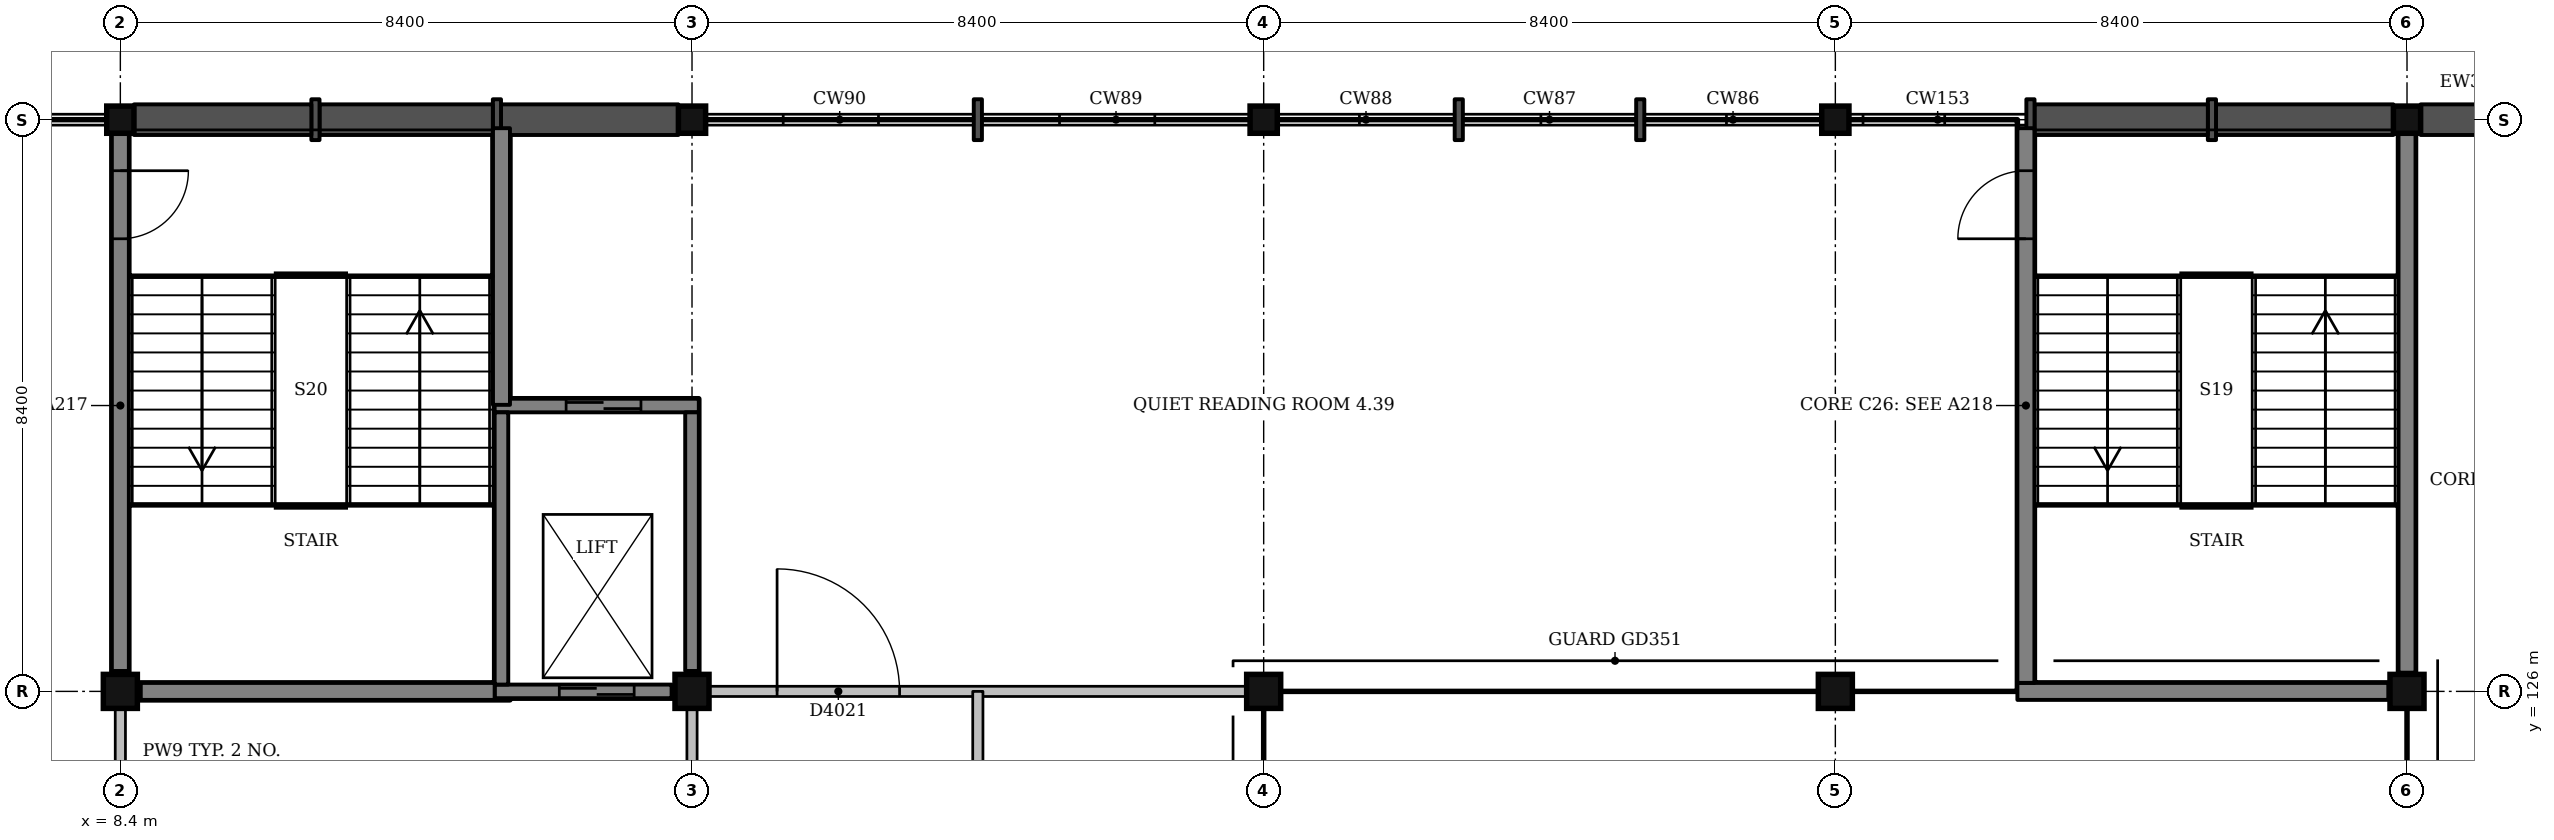
"""IFC4 building model, lengths in metres.
Left out: names, types, materials, properties, quantities, classifications, styles, units other than length and angle.
Written with IfcOpenShell. Run it as: python <this file> out.ifc"""

import sys

from ifc_helpers import new_model, si_unit, direction, frame, frame_2d, origin, origin_2d, place, context, subcontext, project, spatial, rectangle, extrude, element, fill, save


model = new_model("IFC4")
c1 = context("Model", 3, precision=1e-05, world=origin(), true_north=direction((0.0, 1.0)))
c2 = subcontext(c1, "Body", "Model", "MODEL_VIEW")
j1 = project(units=[si_unit("LENGTHUNIT", "METRE"), si_unit("PLANEANGLEUNIT", "RADIAN")], contexts=[c1])
p1 = place(None, origin())
s1 = spatial("IfcSite", under=j1, at=p1, CompositionType="ELEMENT")
p2 = place(p1, origin())
s2 = spatial("IfcBuilding", under=s1, at=p2, CompositionType="ELEMENT")
p3 = place(p2, frame((0.0, 0.0, 18.0)))
s3 = spatial("IfcBuildingStorey", under=s2, at=p3, CompositionType="ELEMENT", Elevation=18.0)
p4 = place(p3, frame((8.4, 126.0, 0.0), z_axis=(0.0, 0.0, 1.0), x_axis=(1.0, 0.0, 0.0)))
e1 = element("IfcColumn", 1, at=p4, inside=s3, PredefinedType="COLUMN", context=c2, shape_type="SweptSolid", body=[
    extrude(rectangle(XDim=0.5, YDim=0.5, at=origin_2d()), origin(), (0.0, 0.0, 1.0), 4.5),
])
p5 = place(p3, frame((8.4, 134.4, 0.0), z_axis=(0.0, 0.0, 1.0), x_axis=(1.0, 0.0, 0.0)))
e2 = element("IfcColumn", 2, at=p5, inside=s3, PredefinedType="COLUMN", context=c2, shape_type="SweptSolid", body=[
    extrude(rectangle(XDim=0.4, YDim=0.4, at=origin_2d()), origin(), (0.0, 0.0, 1.0), 4.5),
])
p6 = place(p3, frame((16.8, 126.0, 0.0), z_axis=(0.0, 0.0, 1.0), x_axis=(1.0, 0.0, 0.0)))
e3 = element("IfcColumn", 3, at=p6, inside=s3, PredefinedType="COLUMN", context=c2, shape_type="SweptSolid", body=[
    extrude(rectangle(XDim=0.5, YDim=0.5, at=origin_2d()), origin(), (0.0, 0.0, 1.0), 4.5),
])
p7 = place(p3, frame((16.8, 134.4, 0.0), z_axis=(0.0, 0.0, 1.0), x_axis=(1.0, 0.0, 0.0)))
e4 = element("IfcColumn", 4, at=p7, inside=s3, PredefinedType="COLUMN", context=c2, shape_type="SweptSolid", body=[
    extrude(rectangle(XDim=0.4, YDim=0.4, at=origin_2d()), origin(), (0.0, 0.0, 1.0), 4.5),
])
p8 = place(p3, frame((25.2, 126.0, 0.0), z_axis=(0.0, 0.0, 1.0), x_axis=(1.0, 0.0, 0.0)))
e5 = element("IfcColumn", 5, at=p8, inside=s3, PredefinedType="COLUMN", context=c2, shape_type="SweptSolid", body=[
    extrude(rectangle(XDim=0.5, YDim=0.5, at=origin_2d()), origin(), (0.0, 0.0, 1.0), 4.5),
])
p9 = place(p3, frame((25.2, 134.4, 0.0), z_axis=(0.0, 0.0, 1.0), x_axis=(1.0, 0.0, 0.0)))
e6 = element("IfcColumn", 6, at=p9, inside=s3, PredefinedType="COLUMN", context=c2, shape_type="SweptSolid", body=[
    extrude(rectangle(XDim=0.4, YDim=0.4, at=origin_2d()), origin(), (0.0, 0.0, 1.0), 4.5),
])
p10 = place(p3, frame((33.6, 126.0, 0.0), z_axis=(0.0, 0.0, 1.0), x_axis=(1.0, 0.0, 0.0)))
e7 = element("IfcColumn", 7, at=p10, inside=s3, PredefinedType="COLUMN", context=c2, shape_type="SweptSolid", body=[
    extrude(rectangle(XDim=0.5, YDim=0.5, at=origin_2d()), origin(), (0.0, 0.0, 1.0), 4.5),
])
p11 = place(p3, frame((33.6, 134.4, 0.0), z_axis=(0.0, 0.0, 1.0), x_axis=(1.0, 0.0, 0.0)))
e8 = element("IfcColumn", 8, at=p11, inside=s3, PredefinedType="COLUMN", context=c2, shape_type="SweptSolid", body=[
    extrude(rectangle(XDim=0.4, YDim=0.4, at=origin_2d()), origin(), (0.0, 0.0, 1.0), 4.5),
])
p12 = place(p3, frame((42.0, 126.0, 0.0), z_axis=(0.0, 0.0, 1.0), x_axis=(1.0, 0.0, 0.0)))
e9 = element("IfcColumn", 9, at=p12, inside=s3, PredefinedType="COLUMN", context=c2, shape_type="SweptSolid", body=[
    extrude(rectangle(XDim=0.5, YDim=0.5, at=origin_2d()), origin(), (0.0, 0.0, 1.0), 4.5),
])
p13 = place(p3, frame((42.0, 134.4, 0.0), z_axis=(0.0, 0.0, 1.0), x_axis=(1.0, 0.0, 0.0)))
e10 = element("IfcColumn", 10, at=p13, inside=s3, PredefinedType="COLUMN", context=c2, shape_type="SweptSolid", body=[
    extrude(rectangle(XDim=0.4, YDim=0.4, at=origin_2d()), origin(), (0.0, 0.0, 1.0), 4.5),
])
p14 = place(p3, frame((13.9, 126.0, 0.0), z_axis=(0.0, 0.0, 1.0), x_axis=(1.0, 0.0, 0.0)))
e11 = element("IfcWall", 11, at=p14, inside=s3, PredefinedType="SHEAR", context=c2, shape_type="SweptSolid", body=[
    extrude(rectangle(XDim=2.6, YDim=0.2, at=frame_2d((1.3, 0.0))), origin(), (0.0, 0.0, 1.0), 4.5),
])
p15 = place(p14, frame((0.95, 0.0, 0.0)))
e12 = element("IfcOpeningElement", 12, at=p15, cuts=e11, PredefinedType="OPENING", context=c2, shape_type="SweptSolid", body=[
    extrude(rectangle(XDim=1.1, YDim=2.1, at=frame_2d((0.55, 1.05))), frame((0.0, 0.11, 0.0), z_axis=(0.0, -1.0, 0.0), x_axis=(1.0, 0.0, 0.0)), (0.0, 0.0, 1.0), 0.22),
])
p16 = place(p3, frame((13.9, 130.2, 0.0), z_axis=(0.0, 0.0, 1.0), x_axis=(1.0, 0.0, 0.0)))
e13 = element("IfcWall", 13, at=p16, inside=s3, PredefinedType="SHEAR", context=c2, shape_type="SweptSolid", body=[
    extrude(rectangle(XDim=3.0, YDim=0.2, at=frame_2d((1.5, 0.0))), origin(), (0.0, 0.0, 1.0), 4.5),
])
p17 = place(p16, frame((1.05, 0.0, 0.0)))
e14 = element("IfcOpeningElement", 14, at=p17, cuts=e13, PredefinedType="OPENING", context=c2, shape_type="SweptSolid", body=[
    extrude(rectangle(XDim=1.1, YDim=2.1, at=frame_2d((0.55, 1.05))), frame((0.0, 0.11, 0.0), z_axis=(0.0, -1.0, 0.0), x_axis=(1.0, 0.0, 0.0)), (0.0, 0.0, 1.0), 0.22),
])
p18 = place(p3, frame((14.0, 126.1, 0.0), z_axis=(0.0, 0.0, 1.0), x_axis=(0.0, 1.0, 0.0)))
e15 = element("IfcWall", 15, at=p18, inside=s3, PredefinedType="SHEAR", context=c2, shape_type="SweptSolid", body=[
    extrude(rectangle(XDim=4.0, YDim=0.2, at=frame_2d((2.0, 0.0))), origin(), (0.0, 0.0, 1.0), 4.5),
])
p19 = place(p3, frame((16.8, 126.3, 0.0), z_axis=(0.0, 0.0, 1.0), x_axis=(0.0, 1.0, 0.0)))
e16 = element("IfcWall", 16, at=p19, inside=s3, PredefinedType="SHEAR", context=c2, shape_type="SweptSolid", body=[
    extrude(rectangle(XDim=3.8, YDim=0.2, at=frame_2d((1.9, 0.0))), origin(), (0.0, 0.0, 1.0), 4.5),
])
p20 = place(p3, frame((36.275, 126.0, 0.0), z_axis=(0.0, 0.0, 1.0), x_axis=(1.0, 0.0, 0.0)))
e17 = element("IfcWall", 17, at=p20, inside=s3, PredefinedType="SHEAR", context=c2, shape_type="SweptSolid", body=[
    extrude(rectangle(XDim=5.45, YDim=0.25, at=frame_2d((2.725, 0.0))), origin(), (0.0, 0.0, 1.0), 4.5),
])
p21 = place(p3, frame((36.4, 126.125, 0.0), z_axis=(0.0, 0.0, 1.0), x_axis=(0.0, 1.0, 0.0)))
e18 = element("IfcWall", 18, at=p21, inside=s3, PredefinedType="SHEAR", context=c2, shape_type="SweptSolid", body=[
    extrude(rectangle(XDim=8.15, YDim=0.25, at=frame_2d((4.075, 0.0))), origin(), (0.0, 0.0, 1.0), 4.5),
])
p22 = place(p21, frame((6.525, 0.0, 0.0)))
e19 = element("IfcOpeningElement", 19, at=p22, cuts=e18, PredefinedType="OPENING", context=c2, shape_type="SweptSolid", body=[
    extrude(rectangle(XDim=1.0, YDim=2.1, at=frame_2d((0.5, 1.05))), frame((0.0, 0.135, 0.0), z_axis=(0.0, -1.0, 0.0), x_axis=(1.0, 0.0, 0.0)), (0.0, 0.0, 1.0), 0.27),
])
p23 = place(p3, frame((42.0, 126.275, 0.0), z_axis=(0.0, 0.0, 1.0), x_axis=(0.0, 1.0, 0.0)))
e20 = element("IfcWall", 20, at=p23, inside=s3, PredefinedType="SHEAR", context=c2, shape_type="SweptSolid", body=[
    extrude(rectangle(XDim=7.925, YDim=0.25, at=frame_2d((3.962, 0.0))), origin(), (0.0, 0.0, 1.0), 4.5),
])
p24 = place(p3, frame((8.7, 126.0, 0.0), z_axis=(0.0, 0.0, 1.0), x_axis=(1.0, 0.0, 0.0)))
e21 = element("IfcWall", 21, at=p24, inside=s3, PredefinedType="SHEAR", context=c2, shape_type="SweptSolid", body=[
    extrude(rectangle(XDim=5.2, YDim=0.25, at=frame_2d((2.6, 0.0))), origin(), (0.0, 0.0, 1.0), 4.5),
])
p25 = place(p3, frame((8.4, 126.3, 0.0), z_axis=(0.0, 0.0, 1.0), x_axis=(0.0, 1.0, 0.0)))
e22 = element("IfcWall", 22, at=p25, inside=s3, PredefinedType="SHEAR", context=c2, shape_type="SweptSolid", body=[
    extrude(rectangle(XDim=7.9, YDim=0.25, at=frame_2d((3.95, 0.0))), origin(), (0.0, 0.0, 1.0), 4.5),
])
p26 = place(p25, frame((6.35, 0.0, 0.0)))
e23 = element("IfcOpeningElement", 23, at=p26, cuts=e22, PredefinedType="OPENING", context=c2, shape_type="SweptSolid", body=[
    extrude(rectangle(XDim=1.0, YDim=2.1, at=frame_2d((0.5, 1.05))), frame((0.0, 0.135, 0.0), z_axis=(0.0, -1.0, 0.0), x_axis=(1.0, 0.0, 0.0)), (0.0, 0.0, 1.0), 0.27),
])
p27 = place(p3, frame((14.0, 130.21, 0.0), z_axis=(0.0, 0.0, 1.0), x_axis=(0.0, 1.0, 0.0)))
e24 = element("IfcWall", 24, at=p27, inside=s3, PredefinedType="SHEAR", context=c2, shape_type="SweptSolid", body=[
    extrude(rectangle(XDim=4.065, YDim=0.25, at=frame_2d((2.032, 0.0))), origin(), (0.0, 0.0, 1.0), 4.5),
])
for number, where, z_axis, x_axis in (
    (25, (44.807, 134.4, 0.0), (0.0, 0.0, 1.0), (-1.0, 0.0, 0.0)),
    (26, (41.8, 134.4, 0.0), (0.0, 0.0, 1.0), (-1.0, 0.0, 0.0)),
):
    element("IfcWall", number, at=place(p3, frame(where, z_axis=z_axis, x_axis=x_axis)), inside=s3, PredefinedType="SOLIDWALL", context=c2, shape_type="SweptSolid", body=[
        extrude(rectangle(XDim=2.607, YDim=0.45, at=frame_2d((1.303, 0.0))), origin(), (0.0, 0.0, 1.0), 3.35),
    ])
p28 = place(p3, frame((39.193, 134.4, 0.0), z_axis=(0.0, 0.0, 1.0), x_axis=(-1.0, 0.0, 0.0)))
e27 = element("IfcWall", 27, at=p28, inside=s3, PredefinedType="SOLIDWALL", context=c2, shape_type="SweptSolid", body=[
    extrude(rectangle(XDim=0.12, YDim=0.6, at=frame_2d((0.06, 0.0))), origin(), (0.0, 0.0, 1.0), 3.35),
])
p29 = place(p3, frame((39.073, 134.4, 0.0), z_axis=(0.0, 0.0, 1.0), x_axis=(-1.0, 0.0, 0.0)))
e28 = element("IfcWall", 28, at=p29, inside=s3, PredefinedType="SOLIDWALL", context=c2, shape_type="SweptSolid", body=[
    extrude(rectangle(XDim=2.547, YDim=0.45, at=frame_2d((1.273, 0.0))), origin(), (0.0, 0.0, 1.0), 3.35),
])
for number, where, z_axis, x_axis in (
    (29, (36.527, 134.4, 0.0), (0.0, 0.0, 1.0), (-1.0, 0.0, 0.0)),
    (30, (30.793, 134.4, 0.0), (0.0, 0.0, 1.0), (-1.0, 0.0, 0.0)),
):
    element("IfcWall", number, at=place(p3, frame(where, z_axis=z_axis, x_axis=x_axis)), inside=s3, PredefinedType="SOLIDWALL", context=c2, shape_type="SweptSolid", body=[
        extrude(rectangle(XDim=0.12, YDim=0.6, at=frame_2d((0.06, 0.0))), origin(), (0.0, 0.0, 1.0), 3.35),
    ])
for number, where, z_axis, x_axis in (
    (31, (28.127, 134.4, 0.0), (0.0, 0.0, 1.0), (-1.0, 0.0, 0.0)),
    (32, (21.06, 134.4, 0.0), (0.0, 0.0, 1.0), (-1.0, 0.0, 0.0)),
):
    element("IfcWall", number, at=place(p3, frame(where, z_axis=z_axis, x_axis=x_axis)), inside=s3, PredefinedType="SOLIDWALL", context=c2, shape_type="SweptSolid", body=[
        extrude(rectangle(XDim=0.12, YDim=0.6, at=frame_2d((0.06, 0.0))), origin(), (0.0, 0.0, 1.0), 3.35),
    ])
p30 = place(p3, frame((16.6, 134.4, 0.0), z_axis=(0.0, 0.0, 1.0), x_axis=(-1.0, 0.0, 0.0)))
e33 = element("IfcWall", 33, at=p30, inside=s3, PredefinedType="SOLIDWALL", context=c2, shape_type="SweptSolid", body=[
    extrude(rectangle(XDim=2.607, YDim=0.45, at=frame_2d((1.303, 0.0))), origin(), (0.0, 0.0, 1.0), 3.35),
])
p31 = place(p3, frame((13.993, 134.4, 0.0), z_axis=(0.0, 0.0, 1.0), x_axis=(-1.0, 0.0, 0.0)))
e34 = element("IfcWall", 34, at=p31, inside=s3, PredefinedType="SOLIDWALL", context=c2, shape_type="SweptSolid", body=[
    extrude(rectangle(XDim=0.12, YDim=0.6, at=frame_2d((0.06, 0.0))), origin(), (0.0, 0.0, 1.0), 3.35),
])
p32 = place(p3, frame((13.873, 134.4, 0.0), z_axis=(0.0, 0.0, 1.0), x_axis=(-1.0, 0.0, 0.0)))
e35 = element("IfcWall", 35, at=p32, inside=s3, PredefinedType="SOLIDWALL", context=c2, shape_type="SweptSolid", body=[
    extrude(rectangle(XDim=2.547, YDim=0.45, at=frame_2d((1.273, 0.0))), origin(), (0.0, 0.0, 1.0), 3.35),
])
p33 = place(p3, frame((11.327, 134.4, 0.0), z_axis=(0.0, 0.0, 1.0), x_axis=(-1.0, 0.0, 0.0)))
e36 = element("IfcWall", 36, at=p33, inside=s3, PredefinedType="SOLIDWALL", context=c2, shape_type="SweptSolid", body=[
    extrude(rectangle(XDim=0.12, YDim=0.6, at=frame_2d((0.06, 0.0))), origin(), (0.0, 0.0, 1.0), 3.35),
])
p34 = place(p3, frame((11.207, 134.4, 0.0), z_axis=(0.0, 0.0, 1.0), x_axis=(-1.0, 0.0, 0.0)))
e37 = element("IfcWall", 37, at=p34, inside=s3, PredefinedType="SOLIDWALL", context=c2, shape_type="SweptSolid", body=[
    extrude(rectangle(XDim=2.607, YDim=0.45, at=frame_2d((1.303, 0.0))), origin(), (0.0, 0.0, 1.0), 3.35),
])
p35 = place(p3, frame((17.05, 126.0, 0.0), z_axis=(0.0, 0.0, 1.0), x_axis=(1.0, 0.0, 0.0)))
e38 = element("IfcWall", 38, at=p35, inside=s3, PredefinedType="PARTITIONING", context=c2, shape_type="SweptSolid", body=[
    extrude(rectangle(XDim=7.9, YDim=0.15, at=frame_2d((3.95, 0.0))), origin(), (0.0, 0.0, 1.0), 3.4),
])
p36 = place(p35, frame((1.0, 0.0, 0.0)))
e39 = element("IfcOpeningElement", 39, at=p36, cuts=e38, PredefinedType="OPENING", context=c2, shape_type="SweptSolid", body=[
    extrude(rectangle(XDim=1.8, YDim=2.1, at=frame_2d((0.9, 1.05))), frame((0.0, 0.085, 0.0), z_axis=(0.0, -1.0, 0.0), x_axis=(1.0, 0.0, 0.0)), (0.0, 0.0, 1.0), 0.17),
])
p37 = place(p3, frame((8.4, 121.8, 0.0), z_axis=(0.0, 0.0, 1.0), x_axis=(0.0, 1.0, 0.0)))
e40 = element("IfcWall", 40, at=p37, inside=s3, PredefinedType="PARTITIONING", context=c2, shape_type="SweptSolid", body=[
    extrude(rectangle(XDim=3.95, YDim=0.15, at=frame_2d((1.975, 0.0))), origin(), (0.0, 0.0, 1.0), 3.4),
])
p38 = place(p37, frame((1.35, 0.0, 0.0)))
e41 = element("IfcOpeningElement", 41, at=p38, cuts=e40, PredefinedType="OPENING", context=c2, shape_type="SweptSolid", body=[
    extrude(rectangle(XDim=1.0, YDim=2.1, at=frame_2d((0.5, 1.05))), frame((0.0, 0.085, 0.0), z_axis=(0.0, -1.0, 0.0), x_axis=(1.0, 0.0, 0.0)), (0.0, 0.0, 1.0), 0.17),
])
p39 = place(p3, frame((16.8, 121.8, 0.0), z_axis=(0.0, 0.0, 1.0), x_axis=(0.0, 1.0, 0.0)))
e42 = element("IfcWall", 42, at=p39, inside=s3, PredefinedType="PARTITIONING", context=c2, shape_type="SweptSolid", body=[
    extrude(rectangle(XDim=3.95, YDim=0.15, at=frame_2d((1.975, 0.0))), origin(), (0.0, 0.0, 1.0), 3.4),
])
p40 = place(p3, frame((21.0, 121.8, 0.0), z_axis=(0.0, 0.0, 1.0), x_axis=(0.0, 1.0, 0.0)))
e43 = element("IfcWall", 43, at=p40, inside=s3, PredefinedType="PARTITIONING", context=c2, shape_type="SweptSolid", body=[
    extrude(rectangle(XDim=4.2, YDim=0.15, at=frame_2d((2.1, 0.0))), origin(), (0.0, 0.0, 1.0), 3.4),
])
p41 = place(p36, origin())
e44 = element("IfcDoor", 44, at=p41, inside=s3, OperationType="DOUBLE_DOOR_SINGLE_SWING", PredefinedType="DOOR", context=c2, shape_type="SweptSolid", body=[
    extrude(rectangle(XDim=1.8, YDim=2.1, at=frame_2d((0.9, 1.05))), frame((0.0, 0.025, 0.0), z_axis=(0.0, -1.0, 0.0), x_axis=(1.0, 0.0, 0.0)), (0.0, 0.0, 1.0), 0.05),
])
fill(e39, e44)
p42 = place(p22, origin())
e45 = element("IfcDoor", 45, at=p42, inside=s3, OperationType="SINGLE_SWING_LEFT", PredefinedType="DOOR", context=c2, shape_type="SweptSolid", body=[
    extrude(rectangle(XDim=1.0, YDim=2.1, at=frame_2d((0.5, 1.05))), frame((0.0, 0.025, 0.0), z_axis=(0.0, -1.0, 0.0), x_axis=(1.0, 0.0, 0.0)), (0.0, 0.0, 1.0), 0.05),
])
fill(e19, e45)
p43 = place(p26, origin())
e46 = element("IfcDoor", 46, at=p43, inside=s3, OperationType="SINGLE_SWING_RIGHT", PredefinedType="DOOR", context=c2, shape_type="SweptSolid", body=[
    extrude(rectangle(XDim=1.0, YDim=2.1, at=frame_2d((0.5, 1.05))), frame((0.0, 0.025, 0.0), z_axis=(0.0, -1.0, 0.0), x_axis=(1.0, 0.0, 0.0)), (0.0, 0.0, 1.0), 0.05),
])
fill(e23, e46)
p44 = place(p15, origin())
e47 = element("IfcDoor", 47, at=p44, inside=s3, OperationType="SLIDING_TO_LEFT", PredefinedType="DOOR", context=c2, shape_type="SweptSolid", body=[
    extrude(rectangle(XDim=1.1, YDim=2.1, at=frame_2d((0.55, 1.05))), frame((0.0, 0.025, 0.0), z_axis=(0.0, -1.0, 0.0), x_axis=(1.0, 0.0, 0.0)), (0.0, 0.0, 1.0), 0.05),
])
fill(e12, e47)
p45 = place(p17, origin())
e48 = element("IfcDoor", 48, at=p45, inside=s3, OperationType="SLIDING_TO_RIGHT", PredefinedType="DOOR", context=c2, shape_type="SweptSolid", body=[
    extrude(rectangle(XDim=1.1, YDim=2.1, at=frame_2d((0.55, 1.05))), frame((0.0, 0.025, 0.0), z_axis=(0.0, -1.0, 0.0), x_axis=(1.0, 0.0, 0.0)), (0.0, 0.0, 1.0), 0.05),
])
fill(e14, e48)
save(model, sys.argv[1])
